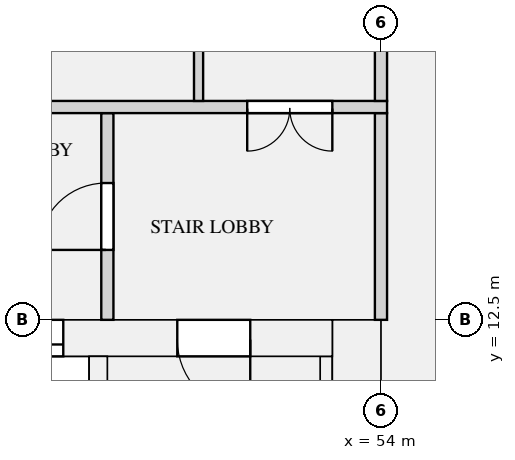
"""IFC4 building model, lengths in metres.
Left out: names, types, materials, properties, quantities, classifications, styles, units other than length and angle.
Written with IfcOpenShell. Run it as: python <this file> out.ifc"""

import sys

from ifc_helpers import new_model, si_unit, direction, frame, frame_2d, origin, place, context, subcontext, project, spatial, rectangle, extrude, element, fill, save


model = new_model("IFC4")
c1 = context("Model", 3, precision=1e-05, world=origin(), true_north=direction((0.0, 1.0)))
c2 = subcontext(c1, "Body", "Model", "MODEL_VIEW")
j1 = project(units=[si_unit("LENGTHUNIT", "METRE"), si_unit("PLANEANGLEUNIT", "RADIAN")], contexts=[c1])
p1 = place(None, origin())
s1 = spatial("IfcSite", under=j1, at=p1, CompositionType="ELEMENT")
p2 = place(p1, origin())
s2 = spatial("IfcBuilding", under=s1, at=p2, CompositionType="ELEMENT")
p3 = place(p2, frame((0.0, 0.0, 118.2)))
s3 = spatial("IfcBuildingStorey", under=s2, at=p3, CompositionType="ELEMENT", Elevation=118.2)
p4 = place(p3, frame((53.6, 0.0, 0.0), z_axis=(0.0, 0.0, 1.0), x_axis=(0.0, 1.0, 0.0)))
e1 = element("IfcWall", 1, at=p4, inside=s3, PredefinedType="SHEAR", context=c2, shape_type="SweptSolid", body=[
    extrude(rectangle(XDim=12.5, YDim=0.8, at=frame_2d((6.25, 0.0))), origin(), (0.0, 0.0, 1.0), 3.15),
])
p5 = place(p3, frame((18.8, 12.2, 0.0), z_axis=(0.0, 0.0, 1.0), x_axis=(1.0, 0.0, 0.0)))
e2 = element("IfcWall", 2, at=p5, inside=s3, PredefinedType="SHEAR", context=c2, shape_type="SweptSolid", body=[
    extrude(rectangle(XDim=34.4, YDim=0.6, at=frame_2d((17.2, 0.0))), origin(), (0.0, 0.0, 1.0), 3.15),
])
p6 = place(p5, frame((24.375, 0.0, 0.0)))
e3 = element("IfcOpeningElement", 3, at=p6, cuts=e2, PredefinedType="OPENING", context=c2, shape_type="SweptSolid", body=[
    extrude(rectangle(XDim=1.1, YDim=2.1, at=frame_2d((0.55, 1.05))), frame((0.0, 0.31, 0.0), z_axis=(0.0, -1.0, 0.0), x_axis=(1.0, 0.0, 0.0)), (0.0, 0.0, 1.0), 0.62),
])
p7 = place(p5, frame((26.625, 0.0, 0.0)))
e4 = element("IfcOpeningElement", 4, at=p7, cuts=e2, PredefinedType="OPENING", context=c2, shape_type="SweptSolid", body=[
    extrude(rectangle(XDim=1.1, YDim=2.1, at=frame_2d((0.55, 1.05))), frame((0.0, 0.31, 0.0), z_axis=(0.0, -1.0, 0.0), x_axis=(1.0, 0.0, 0.0)), (0.0, 0.0, 1.0), 0.62),
])
p8 = place(p5, frame((28.875, 0.0, 0.0)))
e5 = element("IfcOpeningElement", 5, at=p8, cuts=e2, PredefinedType="OPENING", context=c2, shape_type="SweptSolid", body=[
    extrude(rectangle(XDim=1.1, YDim=2.1, at=frame_2d((0.55, 1.05))), frame((0.0, 0.31, 0.0), z_axis=(0.0, -1.0, 0.0), x_axis=(1.0, 0.0, 0.0)), (0.0, 0.0, 1.0), 0.62),
])
p9 = place(p5, frame((11.75, 0.0, 0.0)))
e6 = element("IfcOpeningElement", 6, at=p9, cuts=e2, PredefinedType="OPENING", context=c2, shape_type="SweptSolid", body=[
    extrude(rectangle(XDim=0.9, YDim=2.1, at=frame_2d((0.45, 1.05))), frame((0.0, 0.31, 0.0), z_axis=(0.0, -1.0, 0.0), x_axis=(1.0, 0.0, 0.0)), (0.0, 0.0, 1.0), 0.62),
])
p10 = place(p5, frame((18.25, 0.0, 0.0)))
e7 = element("IfcOpeningElement", 7, at=p10, cuts=e2, PredefinedType="OPENING", context=c2, shape_type="SweptSolid", body=[
    extrude(rectangle(XDim=0.9, YDim=2.1, at=frame_2d((0.45, 1.05))), frame((0.0, 0.31, 0.0), z_axis=(0.0, -1.0, 0.0), x_axis=(1.0, 0.0, 0.0)), (0.0, 0.0, 1.0), 0.62),
])
p11 = place(p5, frame((1.35, 0.0, 0.0)))
e8 = element("IfcOpeningElement", 8, at=p11, cuts=e2, PredefinedType="OPENING", context=c2, shape_type="SweptSolid", body=[
    extrude(rectangle(XDim=1.2, YDim=2.1, at=frame_2d((0.6, 1.05))), frame((0.0, 0.31, 0.0), z_axis=(0.0, -1.0, 0.0), x_axis=(1.0, 0.0, 0.0)), (0.0, 0.0, 1.0), 0.62),
])
p12 = place(p5, frame((31.85, 0.0, 0.0)))
e9 = element("IfcOpeningElement", 9, at=p12, cuts=e2, PredefinedType="OPENING", context=c2, shape_type="SweptSolid", body=[
    extrude(rectangle(XDim=1.2, YDim=2.1, at=frame_2d((0.6, 1.05))), frame((0.0, 0.31, 0.0), z_axis=(0.0, -1.0, 0.0), x_axis=(1.0, 0.0, 0.0)), (0.0, 0.0, 1.0), 0.62),
])
p13 = place(p3, frame((53.1, 1.0, 0.0), z_axis=(0.0, 0.0, 1.0), x_axis=(0.0, 1.0, 0.0)))
e10 = element("IfcWall", 10, at=p13, inside=s3, PredefinedType="SHEAR", context=c2, shape_type="SweptSolid", body=[
    extrude(rectangle(XDim=10.9, YDim=0.2, at=frame_2d((5.45, 0.0))), origin(), (0.0, 0.0, 1.0), 3.15),
])
p14 = place(p3, frame((49.35, 8.25, 0.0), z_axis=(0.0, 0.0, 1.0), x_axis=(0.0, 1.0, 0.0)))
e11 = element("IfcWall", 11, at=p14, inside=s3, PredefinedType="SHEAR", context=c2, shape_type="SweptSolid", body=[
    extrude(rectangle(XDim=3.65, YDim=0.3, at=frame_2d((1.825, 0.0))), origin(), (0.0, 0.0, 1.0), 3.15),
])
p15 = place(p3, frame((49.5, 12.5, 0.0), z_axis=(0.0, 0.0, 1.0), x_axis=(0.0, 1.0, 0.0)))
e12 = element("IfcWall", 12, at=p15, inside=s3, PredefinedType="PARTITIONING", context=c2, shape_type="SweptSolid", body=[
    extrude(rectangle(XDim=3.4, YDim=0.2, at=frame_2d((1.7, 0.0))), origin(), (0.0, 0.0, 1.0), 2.83),
])
p16 = place(p15, frame((1.15, 0.0, 0.0)))
e13 = element("IfcOpeningElement", 13, at=p16, cuts=e12, PredefinedType="OPENING", context=c2, shape_type="SweptSolid", body=[
    extrude(rectangle(XDim=1.1, YDim=2.1, at=frame_2d((0.55, 1.05))), frame((0.0, 0.11, 0.0), z_axis=(0.0, -1.0, 0.0), x_axis=(1.0, 0.0, 0.0)), (0.0, 0.0, 1.0), 0.22),
])
p17 = place(p3, frame((54.0, 12.5, 0.0), z_axis=(0.0, 0.0, 1.0), x_axis=(0.0, 1.0, 0.0)))
e14 = element("IfcWall", 14, at=p17, inside=s3, PredefinedType="PARTITIONING", context=c2, shape_type="SweptSolid", body=[
    extrude(rectangle(XDim=3.4, YDim=0.2, at=frame_2d((1.7, 0.0))), origin(), (0.0, 0.0, 1.0), 2.83),
])
p18 = place(p3, frame((17.9, 16.0, 0.0), z_axis=(0.0, 0.0, 1.0), x_axis=(1.0, 0.0, 0.0)))
e15 = element("IfcWall", 15, at=p18, inside=s3, PredefinedType="PARTITIONING", context=c2, shape_type="SweptSolid", body=[
    extrude(rectangle(XDim=36.2, YDim=0.2, at=frame_2d((18.1, 0.0))), origin(), (0.0, 0.0, 1.0), 2.83),
])
p19 = place(p18, frame((0.9, 0.0, 0.0)))
e16 = element("IfcOpeningElement", 16, at=p19, cuts=e15, PredefinedType="OPENING", context=c2, shape_type="SweptSolid", body=[
    extrude(rectangle(XDim=1.4, YDim=2.1, at=frame_2d((0.7, 1.05))), frame((0.0, 0.11, 0.0), z_axis=(0.0, -1.0, 0.0), x_axis=(1.0, 0.0, 0.0)), (0.0, 0.0, 1.0), 0.22),
])
p20 = place(p18, frame((33.9, 0.0, 0.0)))
e17 = element("IfcOpeningElement", 17, at=p20, cuts=e15, PredefinedType="OPENING", context=c2, shape_type="SweptSolid", body=[
    extrude(rectangle(XDim=1.4, YDim=2.1, at=frame_2d((0.7, 1.05))), frame((0.0, 0.11, 0.0), z_axis=(0.0, -1.0, 0.0), x_axis=(1.0, 0.0, 0.0)), (0.0, 0.0, 1.0), 0.22),
])
p21 = place(p3, frame((54.0, 16.1, 0.0), z_axis=(0.0, 0.0, 1.0), x_axis=(0.0, 1.0, 0.0)))
e18 = element("IfcWall", 18, at=p21, inside=s3, PredefinedType="PARTITIONING", context=c2, shape_type="SweptSolid", body=[
    extrude(rectangle(XDim=7.8, YDim=0.2, at=frame_2d((3.9, 0.0))), origin(), (0.0, 0.0, 1.0), 2.83),
])
p22 = place(p21, frame((2.35, 0.0, 0.0)))
e19 = element("IfcOpeningElement", 19, at=p22, cuts=e18, PredefinedType="OPENING", context=c2, shape_type="SweptSolid", body=[
    extrude(rectangle(XDim=1.1, YDim=2.1, at=frame_2d((0.55, 1.05))), frame((0.0, 0.11, 0.0), z_axis=(0.0, -1.0, 0.0), x_axis=(1.0, 0.0, 0.0)), (0.0, 0.0, 1.0), 0.22),
])
p23 = place(p3, frame((51.0, 16.1, 0.0), z_axis=(0.0, 0.0, 1.0), x_axis=(0.0, 1.0, 0.0)))
e20 = element("IfcWall", 20, at=p23, inside=s3, PredefinedType="PARTITIONING", context=c2, shape_type="SweptSolid", body=[
    extrude(rectangle(XDim=4.825, YDim=0.15, at=frame_2d((2.413, 0.0))), origin(), (0.0, 0.0, 1.0), 2.83),
])
p24 = place(p8, origin())
e21 = element("IfcDoor", 21, at=p24, inside=s3, OperationType="DOUBLE_DOOR_SLIDING", PredefinedType="DOOR", context=c2, shape_type="SweptSolid", body=[
    extrude(rectangle(XDim=1.1, YDim=2.1, at=frame_2d((0.55, 1.05))), frame((0.0, 0.025, 0.0), z_axis=(0.0, -1.0, 0.0), x_axis=(1.0, 0.0, 0.0)), (0.0, 0.0, 1.0), 0.05),
])
fill(e5, e21)
p25 = place(p12, frame((1.2, 0.0, 0.0), z_axis=(0.0, 0.0, 1.0), x_axis=(-1.0, 0.0, 0.0)))
e22 = element("IfcDoor", 22, at=p25, inside=s3, OperationType="SINGLE_SWING_LEFT", PredefinedType="DOOR", context=c2, shape_type="SweptSolid", body=[
    extrude(rectangle(XDim=1.2, YDim=2.1, at=frame_2d((0.6, 1.05))), frame((0.0, 0.025, 0.0), z_axis=(0.0, -1.0, 0.0), x_axis=(1.0, 0.0, 0.0)), (0.0, 0.0, 1.0), 0.05),
])
fill(e9, e22)
p26 = place(p16, origin())
e23 = element("IfcDoor", 23, at=p26, inside=s3, OperationType="SINGLE_SWING_LEFT", PredefinedType="DOOR", context=c2, shape_type="SweptSolid", body=[
    extrude(rectangle(XDim=1.1, YDim=2.1, at=frame_2d((0.55, 1.05))), frame((0.0, 0.025, 0.0), z_axis=(0.0, -1.0, 0.0), x_axis=(1.0, 0.0, 0.0)), (0.0, 0.0, 1.0), 0.05),
])
fill(e13, e23)
p27 = place(p20, frame((1.4, 0.0, 0.0), z_axis=(0.0, 0.0, 1.0), x_axis=(-1.0, 0.0, 0.0)))
e24 = element("IfcDoor", 24, at=p27, inside=s3, OperationType="DOUBLE_DOOR_SINGLE_SWING", PredefinedType="DOOR", context=c2, shape_type="SweptSolid", body=[
    extrude(rectangle(XDim=1.4, YDim=2.1, at=frame_2d((0.7, 1.05))), frame((0.0, 0.025, 0.0), z_axis=(0.0, -1.0, 0.0), x_axis=(1.0, 0.0, 0.0)), (0.0, 0.0, 1.0), 0.05),
])
fill(e17, e24)
save(model, sys.argv[1])
